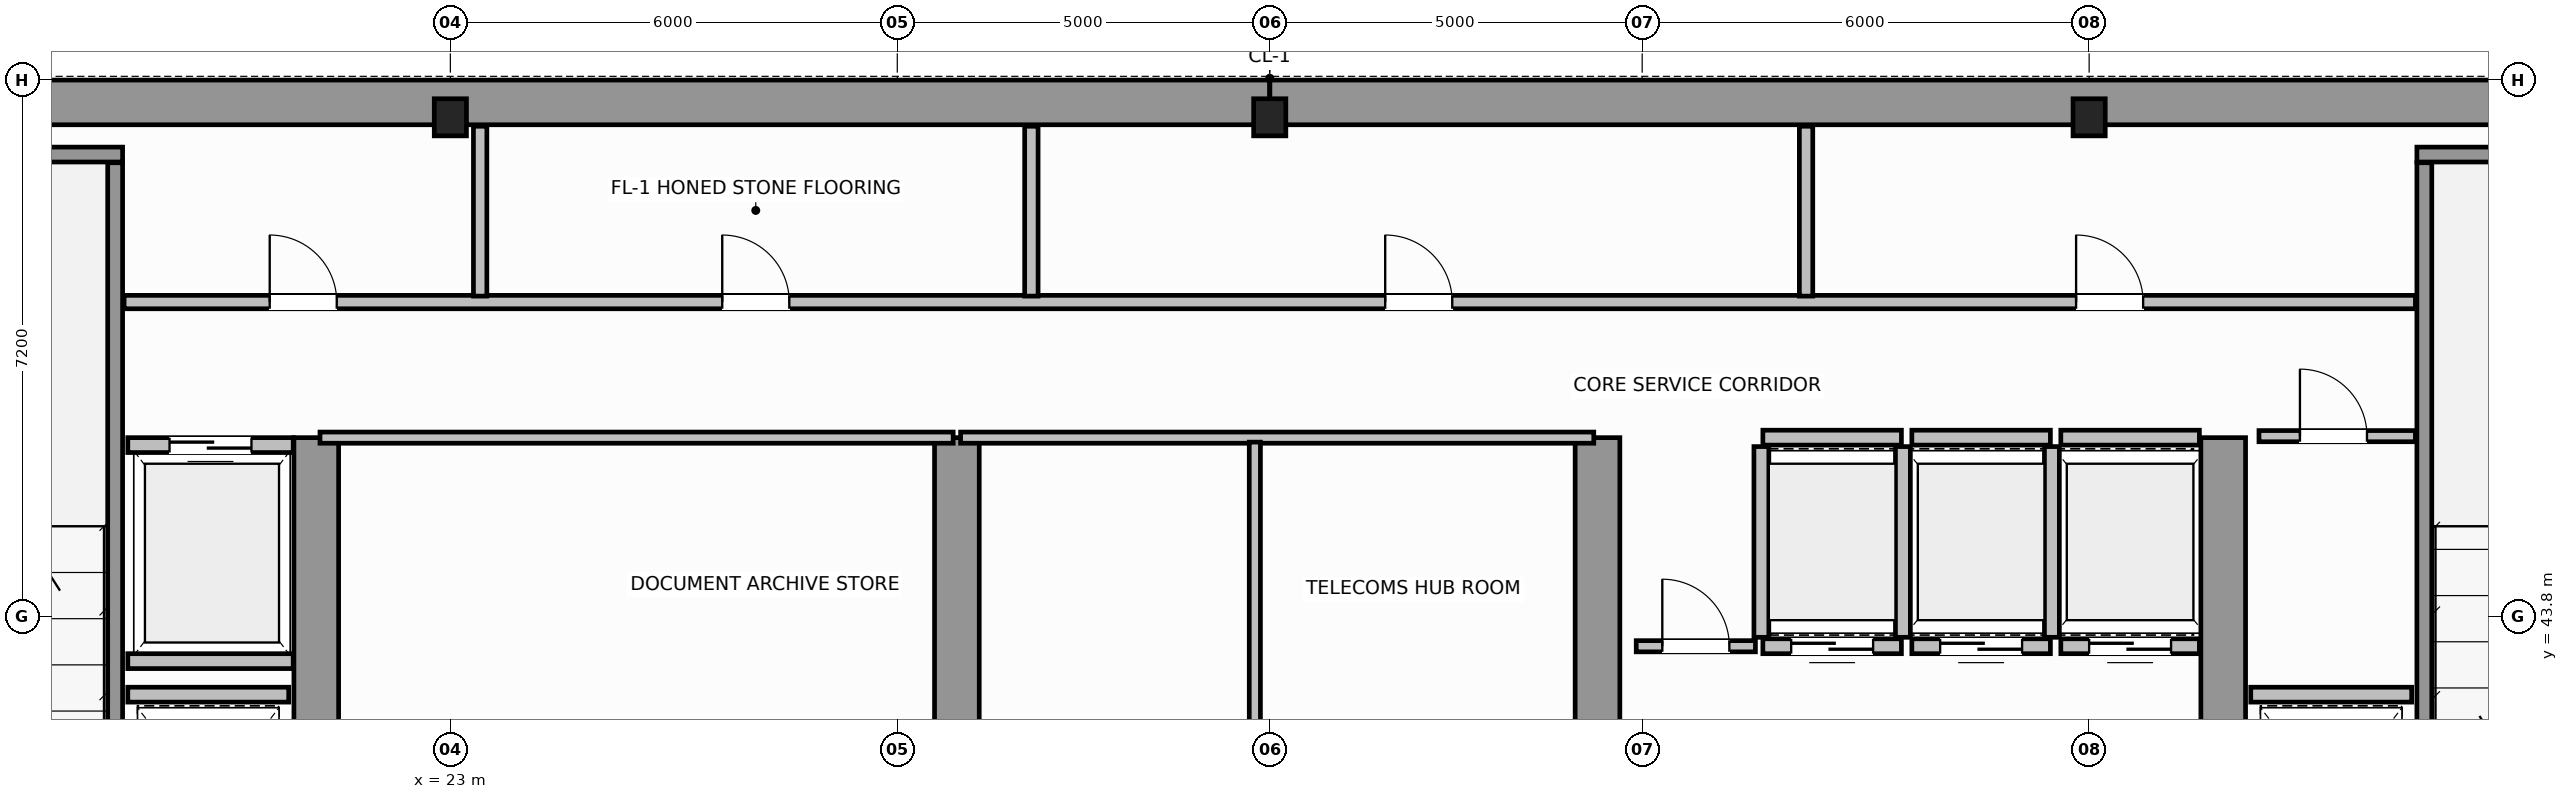
"""IFC4 building model, lengths in metres.
Left out: names, types, materials, properties, quantities, classifications, styles, units other than length and angle.
Written with IfcOpenShell. Run it as: python <this file> out.ifc"""

import sys

from ifc_helpers import new_model, si_unit, direction, frame, frame_2d, origin, origin_2d, place, context, subcontext, project, spatial, rectangle, i_section, extrude, source, transform, mapped, element, fill, save


model = new_model("IFC4")
c1 = context("Model", 3, precision=1e-05, world=origin(), true_north=direction((0.0, 1.0)))
c2 = subcontext(c1, "Body", "Model", "MODEL_VIEW")
j1 = project(units=[si_unit("LENGTHUNIT", "METRE"), si_unit("PLANEANGLEUNIT", "RADIAN")], contexts=[c1])
p1 = place(None, origin())
s1 = spatial("IfcSite", under=j1, at=p1, CompositionType="ELEMENT")
p2 = place(p1, origin())
s2 = spatial("IfcBuilding", under=s1, at=p2, CompositionType="ELEMENT")
p3 = place(p2, frame((0.0, 0.0, 207.0)))
s3 = spatial("IfcBuildingStorey", under=s2, at=p3, CompositionType="ELEMENT", Elevation=207.0)
m1 = source(origin(), c2, "Body", "SweptSolid", [
    extrude(i_section(OverallWidth=0.432, OverallDepth=0.498, WebThickness=0.055, FlangeThickness=0.068, FilletRadius=0.015, at=origin_2d()), origin(), (0.0, 0.0, 1.0), 3.8),
])
for number, where, z_axis, x_axis in (
    (1, (23.0, 50.5, 0.0), (0.0, 0.0, 1.0), (1.0, 0.0, 0.0)),
    (2, (34.0, 50.5, 0.0), (0.0, 0.0, 1.0), (1.0, 0.0, 0.0)),
    (3, (45.0, 50.5, 0.0), (0.0, 0.0, 1.0), (1.0, 0.0, 0.0)),
):
    element("IfcColumn", number, at=place(p3, frame(where, z_axis=z_axis, x_axis=x_axis)), inside=s3, PredefinedType="COLUMN", context=c2, shape_type="MappedRepresentation", body=[
        mapped(m1, transform((0.0, 0.0, 0.0), scale=1.0)),
    ])
for number, where, z_axis, x_axis in (
    (4, (14.304, 50.7, 0.0), (0.0, 0.0, 1.0), (1.0, 0.0, 0.0)),
    (5, (34.002, 50.7, 0.0), (0.0, 0.0, 1.0), (1.0, 0.0, 0.0)),
):
    element("IfcWall", number, at=place(p3, frame(where, z_axis=z_axis, x_axis=x_axis)), inside=s3, PredefinedType="SHEAR", context=c2, shape_type="SweptSolid", body=[
        extrude(rectangle(XDim=19.694, YDim=0.6, at=frame_2d((9.847, 0.0))), origin(), (0.0, 0.0, 1.0), 3.8),
    ])
for number, where, z_axis, x_axis in (
    (6, (21.2, 36.82, 0.0), (0.0, 0.0, 1.0), (0.0, 1.0, 0.0)),
    (7, (29.8, 36.82, 0.0), (0.0, 0.0, 1.0), (0.0, 1.0, 0.0)),
    (8, (38.4, 36.82, 0.0), (0.0, 0.0, 1.0), (0.0, 1.0, 0.0)),
    (9, (46.8, 36.82, 0.0), (0.0, 0.0, 1.0), (0.0, 1.0, 0.0)),
):
    element("IfcWall", number, at=place(p3, frame(where, z_axis=z_axis, x_axis=x_axis)), inside=s3, PredefinedType="SHEAR", context=c2, shape_type="SweptSolid", body=[
        extrude(rectangle(XDim=9.38, YDim=0.6, at=frame_2d((4.69, 0.0))), origin(), (0.0, 0.0, 1.0), 3.8),
    ])
p4 = place(p3, frame((14.3, 50.0, 0.0), z_axis=(0.0, 0.0, 1.0), x_axis=(1.0, 0.0, 0.0)))
e10 = element("IfcWall", 10, at=p4, inside=s3, PredefinedType="SOLIDWALL", context=c2, shape_type="SweptSolid", body=[
    extrude(rectangle(XDim=4.3, YDim=0.2, at=frame_2d((2.15, 0.0))), origin(), (0.0, 0.0, 1.0), 3.8),
])
p5 = place(p3, frame((18.5, 39.96, 0.0), z_axis=(0.0, 0.0, 1.0), x_axis=(0.0, 1.0, 0.0)))
e11 = element("IfcWall", 11, at=p5, inside=s3, PredefinedType="SOLIDWALL", context=c2, shape_type="SweptSolid", body=[
    extrude(rectangle(XDim=9.93, YDim=0.2, at=frame_2d((4.965, 0.0))), origin(), (0.0, 0.0, 1.0), 3.8),
])
p6 = place(p3, frame((49.4, 50.0, 0.0), z_axis=(0.0, 0.0, 1.0), x_axis=(1.0, 0.0, 0.0)))
e12 = element("IfcWall", 12, at=p6, inside=s3, PredefinedType="SOLIDWALL", context=c2, shape_type="SweptSolid", body=[
    extrude(rectangle(XDim=4.3, YDim=0.2, at=frame_2d((2.15, 0.0))), origin(), (0.0, 0.0, 1.0), 3.8),
])
p7 = place(p3, frame((49.5, 39.96, 0.0), z_axis=(0.0, 0.0, 1.0), x_axis=(0.0, 1.0, 0.0)))
e13 = element("IfcWall", 13, at=p7, inside=s3, PredefinedType="SOLIDWALL", context=c2, shape_type="SweptSolid", body=[
    extrude(rectangle(XDim=9.93, YDim=0.2, at=frame_2d((4.965, 0.0))), origin(), (0.0, 0.0, 1.0), 3.8),
])
p8 = place(p3, frame((40.62, 43.4, 0.0), z_axis=(0.0, 0.0, 1.0), x_axis=(1.0, 0.0, 0.0)))
e14 = element("IfcWall", 14, at=p8, inside=s3, PredefinedType="SOLIDWALL", context=c2, shape_type="SweptSolid", body=[
    extrude(rectangle(XDim=1.86, YDim=0.2, at=frame_2d((0.93, 0.0))), origin(), (0.0, 0.0, 1.0), 3.58),
])
p9 = place(p8, frame((0.38, 0.0, 0.0)))
e15 = element("IfcOpeningElement", 15, at=p9, cuts=e14, PredefinedType="OPENING", context=c2, shape_type="SweptSolid", body=[
    extrude(rectangle(XDim=1.1, YDim=2.15, at=frame_2d((0.55, 1.075))), frame((0.0, 0.11, 0.0), z_axis=(0.0, -1.0, 0.0), x_axis=(1.0, 0.0, 0.0)), (0.0, 0.0, 1.0), 0.22),
])
p10 = place(p3, frame((40.62, 46.2, 0.0), z_axis=(0.0, 0.0, 1.0), x_axis=(1.0, 0.0, 0.0)))
e16 = element("IfcWall", 16, at=p10, inside=s3, PredefinedType="SOLIDWALL", context=c2, shape_type="SweptSolid", body=[
    extrude(rectangle(XDim=1.86, YDim=0.2, at=frame_2d((0.93, 0.0))), origin(), (0.0, 0.0, 1.0), 3.58),
])
for number, where, z_axis, x_axis in (
    (17, (40.6, 43.52, 0.0), (0.0, 0.0, 1.0), (0.0, 1.0, 0.0)),
    (18, (42.5, 43.52, 0.0), (0.0, 0.0, 1.0), (0.0, 1.0, 0.0)),
):
    element("IfcWall", number, at=place(p3, frame(where, z_axis=z_axis, x_axis=x_axis)), inside=s3, PredefinedType="SOLIDWALL", context=c2, shape_type="SweptSolid", body=[
        extrude(rectangle(XDim=2.56, YDim=0.2, at=frame_2d((1.28, 0.0))), origin(), (0.0, 0.0, 1.0), 3.58),
    ])
p11 = place(p3, frame((42.62, 43.4, 0.0), z_axis=(0.0, 0.0, 1.0), x_axis=(1.0, 0.0, 0.0)))
e19 = element("IfcWall", 19, at=p11, inside=s3, PredefinedType="SOLIDWALL", context=c2, shape_type="SweptSolid", body=[
    extrude(rectangle(XDim=1.86, YDim=0.2, at=frame_2d((0.93, 0.0))), origin(), (0.0, 0.0, 1.0), 3.58),
])
p12 = place(p11, frame((0.38, 0.0, 0.0)))
e20 = element("IfcOpeningElement", 20, at=p12, cuts=e19, PredefinedType="OPENING", context=c2, shape_type="SweptSolid", body=[
    extrude(rectangle(XDim=1.1, YDim=2.15, at=frame_2d((0.55, 1.075))), frame((0.0, 0.11, 0.0), z_axis=(0.0, -1.0, 0.0), x_axis=(1.0, 0.0, 0.0)), (0.0, 0.0, 1.0), 0.22),
])
p13 = place(p3, frame((42.62, 46.2, 0.0), z_axis=(0.0, 0.0, 1.0), x_axis=(1.0, 0.0, 0.0)))
e21 = element("IfcWall", 21, at=p13, inside=s3, PredefinedType="SOLIDWALL", context=c2, shape_type="SweptSolid", body=[
    extrude(rectangle(XDim=1.86, YDim=0.2, at=frame_2d((0.93, 0.0))), origin(), (0.0, 0.0, 1.0), 3.58),
])
p14 = place(p3, frame((44.5, 43.52, 0.0), z_axis=(0.0, 0.0, 1.0), x_axis=(0.0, 1.0, 0.0)))
e22 = element("IfcWall", 22, at=p14, inside=s3, PredefinedType="SOLIDWALL", context=c2, shape_type="SweptSolid", body=[
    extrude(rectangle(XDim=2.56, YDim=0.2, at=frame_2d((1.28, 0.0))), origin(), (0.0, 0.0, 1.0), 3.58),
])
p15 = place(p3, frame((44.62, 43.4, 0.0), z_axis=(0.0, 0.0, 1.0), x_axis=(1.0, 0.0, 0.0)))
e23 = element("IfcWall", 23, at=p15, inside=s3, PredefinedType="SOLIDWALL", context=c2, shape_type="SweptSolid", body=[
    extrude(rectangle(XDim=1.86, YDim=0.2, at=frame_2d((0.93, 0.0))), origin(), (0.0, 0.0, 1.0), 3.58),
])
p16 = place(p15, frame((0.38, 0.0, 0.0)))
e24 = element("IfcOpeningElement", 24, at=p16, cuts=e23, PredefinedType="OPENING", context=c2, shape_type="SweptSolid", body=[
    extrude(rectangle(XDim=1.1, YDim=2.15, at=frame_2d((0.55, 1.075))), frame((0.0, 0.11, 0.0), z_axis=(0.0, -1.0, 0.0), x_axis=(1.0, 0.0, 0.0)), (0.0, 0.0, 1.0), 0.22),
])
p17 = place(p3, frame((44.62, 46.2, 0.0), z_axis=(0.0, 0.0, 1.0), x_axis=(1.0, 0.0, 0.0)))
e25 = element("IfcWall", 25, at=p17, inside=s3, PredefinedType="SOLIDWALL", context=c2, shape_type="SweptSolid", body=[
    extrude(rectangle(XDim=1.86, YDim=0.2, at=frame_2d((0.93, 0.0))), origin(), (0.0, 0.0, 1.0), 3.58),
])
p18 = place(p3, frame((18.67, 46.1, 0.0), z_axis=(0.0, 0.0, 1.0), x_axis=(1.0, 0.0, 0.0)))
e26 = element("IfcWall", 26, at=p18, inside=s3, PredefinedType="SOLIDWALL", context=c2, shape_type="SweptSolid", body=[
    extrude(rectangle(XDim=2.22, YDim=0.2, at=frame_2d((1.11, 0.0))), origin(), (0.0, 0.0, 1.0), 3.58),
])
p19 = place(p18, frame((0.56, 0.0, 0.0)))
e27 = element("IfcOpeningElement", 27, at=p19, cuts=e26, PredefinedType="OPENING", context=c2, shape_type="SweptSolid", body=[
    extrude(rectangle(XDim=1.1, YDim=2.15, at=frame_2d((0.55, 1.075))), frame((0.0, 0.11, 0.0), z_axis=(0.0, -1.0, 0.0), x_axis=(1.0, 0.0, 0.0)), (0.0, 0.0, 1.0), 0.22),
])
p20 = place(p3, frame((18.67, 43.2, 0.0), z_axis=(0.0, 0.0, 1.0), x_axis=(1.0, 0.0, 0.0)))
e28 = element("IfcWall", 28, at=p20, inside=s3, PredefinedType="SOLIDWALL", context=c2, shape_type="SweptSolid", body=[
    extrude(rectangle(XDim=2.22, YDim=0.2, at=frame_2d((1.11, 0.0))), origin(), (0.0, 0.0, 1.0), 3.58),
])
for number, where, z_axis, x_axis in (
    (29, (18.67, 42.75, 0.0), (0.0, 0.0, 1.0), (1.0, 0.0, 0.0)),
    (30, (47.17, 42.75, 0.0), (0.0, 0.0, 1.0), (1.0, 0.0, 0.0)),
):
    element("IfcWall", number, at=place(p3, frame(where, z_axis=z_axis, x_axis=x_axis)), inside=s3, PredefinedType="SOLIDWALL", context=c2, shape_type="SweptSolid", body=[
        extrude(rectangle(XDim=2.16, YDim=0.2, at=frame_2d((1.08, 0.0))), origin(), (0.0, 0.0, 1.0), 3.58),
    ])
for number, where, z_axis, x_axis in (
    (31, (21.25, 46.2, 0.0), (0.0, 0.0, 1.0), (1.0, 0.0, 0.0)),
    (32, (29.85, 46.2, 0.0), (0.0, 0.0, 1.0), (1.0, 0.0, 0.0)),
):
    element("IfcWall", number, at=place(p3, frame(where, z_axis=z_axis, x_axis=x_axis)), inside=s3, PredefinedType="PARTITIONING", context=c2, shape_type="SweptSolid", body=[
        extrude(rectangle(XDim=8.5, YDim=0.15, at=frame_2d((4.25, 0.0))), origin(), (0.0, 0.0, 1.0), 3.58),
    ])
p21 = place(p3, frame((33.8, 36.56, 0.0), z_axis=(0.0, 0.0, 1.0), x_axis=(0.0, 1.0, 0.0)))
e33 = element("IfcWall", 33, at=p21, inside=s3, PredefinedType="PARTITIONING", context=c2, shape_type="SweptSolid", body=[
    extrude(rectangle(XDim=9.58, YDim=0.15, at=frame_2d((4.79, 0.0))), origin(), (0.0, 0.0, 1.0), 3.58),
])
p22 = place(p21, frame((4.2, 0.0, 0.0)))
e34 = element("IfcOpeningElement", 34, at=p22, cuts=e33, PredefinedType="OPENING", context=c2, shape_type="SweptSolid", body=[
    extrude(rectangle(XDim=0.9, YDim=2.1, at=frame_2d((0.45, 1.05))), frame((0.0, 0.085, 0.0), z_axis=(0.0, -1.0, 0.0), x_axis=(1.0, 0.0, 0.0)), (0.0, 0.0, 1.0), 0.17),
])
p23 = place(p3, frame((47.28, 46.22, 0.0), z_axis=(0.0, 0.0, 1.0), x_axis=(1.0, 0.0, 0.0)))
e35 = element("IfcWall", 35, at=p23, inside=s3, PredefinedType="PARTITIONING", context=c2, shape_type="SweptSolid", body=[
    extrude(rectangle(XDim=2.1, YDim=0.15, at=frame_2d((1.05, 0.0))), origin(), (0.0, 0.0, 1.0), 3.58),
])
p24 = place(p23, frame((0.55, 0.0, 0.0)))
e36 = element("IfcOpeningElement", 36, at=p24, cuts=e35, PredefinedType="OPENING", context=c2, shape_type="SweptSolid", body=[
    extrude(rectangle(XDim=0.9, YDim=2.1, at=frame_2d((0.45, 1.05))), frame((0.0, 0.085, 0.0), z_axis=(0.0, -1.0, 0.0), x_axis=(1.0, 0.0, 0.0)), (0.0, 0.0, 1.0), 0.17),
])
p25 = place(p3, frame((38.92, 43.4, 0.0), z_axis=(0.0, 0.0, 1.0), x_axis=(1.0, 0.0, 0.0)))
e37 = element("IfcWall", 37, at=p25, inside=s3, PredefinedType="PARTITIONING", context=c2, shape_type="SweptSolid", body=[
    extrude(rectangle(XDim=1.6, YDim=0.15, at=frame_2d((0.8, 0.0))), origin(), (0.0, 0.0, 1.0), 3.58),
])
p26 = place(p25, frame((0.35, 0.0, 0.0)))
e38 = element("IfcOpeningElement", 38, at=p26, cuts=e37, PredefinedType="OPENING", context=c2, shape_type="SweptSolid", body=[
    extrude(rectangle(XDim=0.9, YDim=2.1, at=frame_2d((0.45, 1.05))), frame((0.0, 0.085, 0.0), z_axis=(0.0, -1.0, 0.0), x_axis=(1.0, 0.0, 0.0)), (0.0, 0.0, 1.0), 0.17),
])
p27 = place(p3, frame((18.62, 48.02, 0.0), z_axis=(0.0, 0.0, 1.0), x_axis=(1.0, 0.0, 0.0)))
e39 = element("IfcWall", 39, at=p27, inside=s3, PredefinedType="PLUMBINGWALL", context=c2, shape_type="SweptSolid", body=[
    extrude(rectangle(XDim=30.76, YDim=0.18, at=frame_2d((15.38, 0.0))), origin(), (0.0, 0.0, 1.0), 3.58),
])
p28 = place(p27, frame((1.955, 0.0, 0.0)))
e40 = element("IfcOpeningElement", 40, at=p28, cuts=e39, PredefinedType="OPENING", context=c2, shape_type="SweptSolid", body=[
    extrude(rectangle(XDim=0.9, YDim=2.15, at=frame_2d((0.45, 1.075))), frame((0.0, 0.1, 0.0), z_axis=(0.0, -1.0, 0.0), x_axis=(1.0, 0.0, 0.0)), (0.0, 0.0, 1.0), 0.2),
])
p29 = place(p27, frame((8.03, 0.0, 0.0)))
e41 = element("IfcOpeningElement", 41, at=p29, cuts=e39, PredefinedType="OPENING", context=c2, shape_type="SweptSolid", body=[
    extrude(rectangle(XDim=0.9, YDim=2.15, at=frame_2d((0.45, 1.075))), frame((0.0, 0.1, 0.0), z_axis=(0.0, -1.0, 0.0), x_axis=(1.0, 0.0, 0.0)), (0.0, 0.0, 1.0), 0.2),
])
p30 = place(p27, frame((16.93, 0.0, 0.0)))
e42 = element("IfcOpeningElement", 42, at=p30, cuts=e39, PredefinedType="OPENING", context=c2, shape_type="SweptSolid", body=[
    extrude(rectangle(XDim=0.9, YDim=2.15, at=frame_2d((0.45, 1.075))), frame((0.0, 0.1, 0.0), z_axis=(0.0, -1.0, 0.0), x_axis=(1.0, 0.0, 0.0)), (0.0, 0.0, 1.0), 0.2),
])
p31 = place(p27, frame((26.205, 0.0, 0.0)))
e43 = element("IfcOpeningElement", 43, at=p31, cuts=e39, PredefinedType="OPENING", context=c2, shape_type="SweptSolid", body=[
    extrude(rectangle(XDim=0.9, YDim=2.15, at=frame_2d((0.45, 1.075))), frame((0.0, 0.1, 0.0), z_axis=(0.0, -1.0, 0.0), x_axis=(1.0, 0.0, 0.0)), (0.0, 0.0, 1.0), 0.2),
])
for number, where, z_axis, x_axis in (
    (44, (23.4, 48.1, 0.0), (0.0, 0.0, 1.0), (0.0, 1.0, 0.0)),
    (45, (30.8, 48.1, 0.0), (0.0, 0.0, 1.0), (0.0, 1.0, 0.0)),
    (46, (41.2, 48.1, 0.0), (0.0, 0.0, 1.0), (0.0, 1.0, 0.0)),
):
    element("IfcWall", number, at=place(p3, frame(where, z_axis=z_axis, x_axis=x_axis)), inside=s3, PredefinedType="PLUMBINGWALL", context=c2, shape_type="SweptSolid", body=[
        extrude(rectangle(XDim=2.28, YDim=0.18, at=frame_2d((1.14, 0.0))), origin(), (0.0, 0.0, 1.0), 3.58),
    ])
m2 = source(origin(), c2, "Body", "SweptSolid", [
    extrude(rectangle(XDim=1.1, YDim=2.15, at=frame_2d((0.55, 1.075))), frame((0.0, 0.025, 0.0), z_axis=(0.0, -1.0, 0.0), x_axis=(1.0, 0.0, 0.0)), (0.0, 0.0, 1.0), 0.05),
])
p32 = place(p9, origin())
e47 = element("IfcDoor", 47, at=p32, inside=s3, OperationType="DOUBLE_DOOR_SLIDING", PredefinedType="DOOR", context=c2, shape_type="MappedRepresentation", body=[
    mapped(m2, transform((0.0, 0.0, 0.0), scale=1.0)),
])
fill(e15, e47)
p33 = place(p12, origin())
e48 = element("IfcDoor", 48, at=p33, inside=s3, OperationType="DOUBLE_DOOR_SLIDING", PredefinedType="DOOR", context=c2, shape_type="MappedRepresentation", body=[
    mapped(m2, transform((0.0, 0.0, 0.0), scale=1.0)),
])
fill(e20, e48)
p34 = place(p16, origin())
e49 = element("IfcDoor", 49, at=p34, inside=s3, OperationType="DOUBLE_DOOR_SLIDING", PredefinedType="DOOR", context=c2, shape_type="MappedRepresentation", body=[
    mapped(m2, transform((0.0, 0.0, 0.0), scale=1.0)),
])
fill(e24, e49)
p35 = place(p19, origin())
e50 = element("IfcDoor", 50, at=p35, inside=s3, OperationType="DOUBLE_DOOR_SLIDING", PredefinedType="DOOR", context=c2, shape_type="MappedRepresentation", body=[
    mapped(m2, transform((0.0, 0.0, 0.0), scale=1.0)),
])
fill(e27, e50)
m3 = source(origin(), c2, "Body", "SweptSolid", [
    extrude(rectangle(XDim=0.9, YDim=2.1, at=frame_2d((0.45, 1.05))), frame((0.0, 0.025, 0.0), z_axis=(0.0, -1.0, 0.0), x_axis=(1.0, 0.0, 0.0)), (0.0, 0.0, 1.0), 0.05),
])
p36 = place(p24, origin())
e51 = element("IfcDoor", 51, at=p36, inside=s3, OperationType="SINGLE_SWING_RIGHT", PredefinedType="DOOR", context=c2, shape_type="MappedRepresentation", body=[
    mapped(m3, transform((0.0, 0.0, 0.0), scale=1.0)),
])
fill(e36, e51)
p37 = place(p26, origin())
e52 = element("IfcDoor", 52, at=p37, inside=s3, OperationType="SINGLE_SWING_LEFT", PredefinedType="DOOR", context=c2, shape_type="MappedRepresentation", body=[
    mapped(m3, transform((0.0, 0.0, 0.0), scale=1.0)),
])
fill(e38, e52)
m4 = source(origin(), c2, "Body", "SweptSolid", [
    extrude(rectangle(XDim=0.9, YDim=2.15, at=frame_2d((0.45, 1.075))), frame((0.0, 0.025, 0.0), z_axis=(0.0, -1.0, 0.0), x_axis=(1.0, 0.0, 0.0)), (0.0, 0.0, 1.0), 0.05),
])
p38 = place(p28, origin())
e53 = element("IfcDoor", 53, at=p38, inside=s3, OperationType="SINGLE_SWING_LEFT", PredefinedType="DOOR", context=c2, shape_type="MappedRepresentation", body=[
    mapped(m4, transform((0.0, 0.0, 0.0), scale=1.0)),
])
fill(e40, e53)
p39 = place(p29, origin())
e54 = element("IfcDoor", 54, at=p39, inside=s3, OperationType="SINGLE_SWING_RIGHT", PredefinedType="DOOR", context=c2, shape_type="MappedRepresentation", body=[
    mapped(m4, transform((0.0, 0.0, 0.0), scale=1.0)),
])
fill(e41, e54)
p40 = place(p30, origin())
e55 = element("IfcDoor", 55, at=p40, inside=s3, OperationType="SINGLE_SWING_LEFT", PredefinedType="DOOR", context=c2, shape_type="MappedRepresentation", body=[
    mapped(m4, transform((0.0, 0.0, 0.0), scale=1.0)),
])
fill(e42, e55)
p41 = place(p31, origin())
e56 = element("IfcDoor", 56, at=p41, inside=s3, OperationType="SINGLE_SWING_RIGHT", PredefinedType="DOOR", context=c2, shape_type="MappedRepresentation", body=[
    mapped(m4, transform((0.0, 0.0, 0.0), scale=1.0)),
])
fill(e43, e56)
save(model, sys.argv[1])
